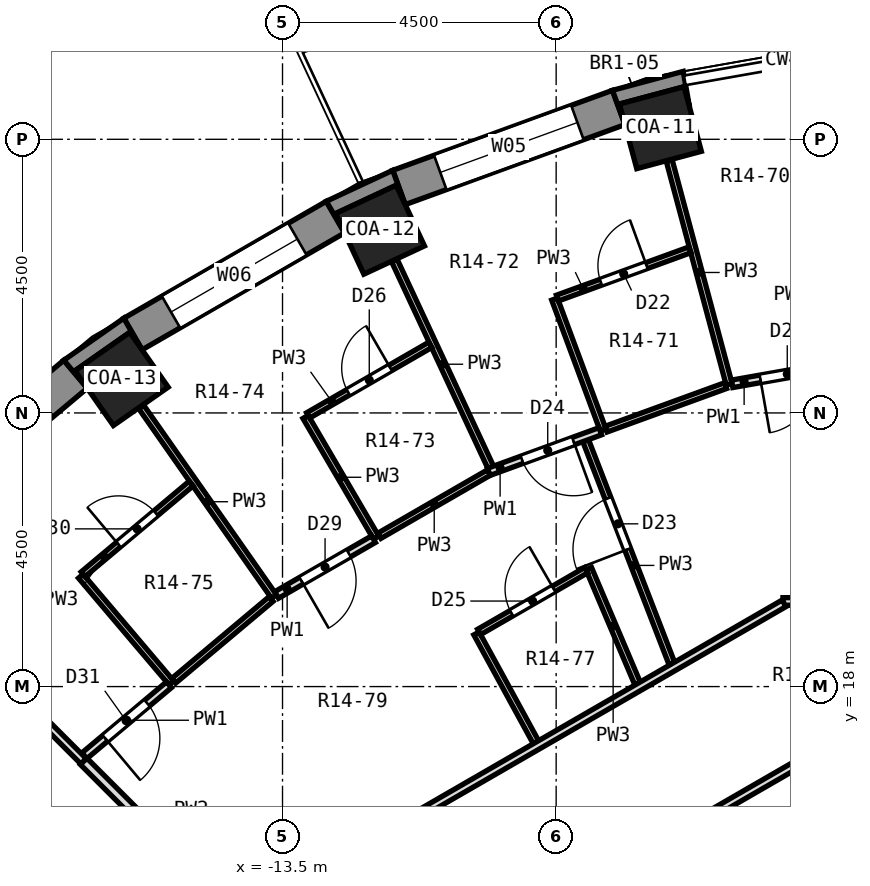
"""IFC4 building model, lengths in metres.
Left out: names, types, materials, properties, quantities, classifications, styles, units other than length and angle.
Written with IfcOpenShell. Run it as: python <this file> out.ifc"""

import sys

from ifc_helpers import new_model, si_unit, direction, frame, frame_2d, origin, origin_2d, place, context, subcontext, project, spatial, polyline, rectangle, outline, extrude, element, fill, save


model = new_model("IFC4")
c1 = context("Model", 3, precision=1e-05, world=origin(), true_north=direction((0.0, 1.0)))
c2 = subcontext(c1, "Body", "Model", "MODEL_VIEW")
j1 = project(units=[si_unit("LENGTHUNIT", "METRE"), si_unit("PLANEANGLEUNIT", "RADIAN")], contexts=[c1])
p1 = place(None, origin())
s1 = spatial("IfcSite", under=j1, at=p1, CompositionType="ELEMENT")
p2 = place(p1, origin())
s2 = spatial("IfcBuilding", under=s1, at=p2, CompositionType="ELEMENT")
p3 = place(p2, frame((0.0, 0.0, 75.8)))
s3 = spatial("IfcBuildingStorey", under=s2, at=p3, CompositionType="ELEMENT", Elevation=75.8)
for number, where, z_axis, x_axis in (
    (1, (-7.286, 27.191, 0.0), (0.0, 0.0, 1.0), (-0.259, 0.966, 0.0)),
    (2, (-11.897, 25.512, 0.0), (0.0, 0.0, 1.0), (-0.423, 0.906, 0.0)),
    (3, (-16.146, 23.059, 0.0), (0.0, 0.0, 1.0), (-0.574, 0.819, 0.0)),
):
    element("IfcColumn", number, at=place(p3, frame(where, z_axis=z_axis, x_axis=x_axis)), inside=s3, PredefinedType="COLUMN", context=c2, shape_type="SweptSolid", body=[
        extrude(rectangle(XDim=1.1, YDim=1.1, at=origin_2d()), origin(), (0.0, 0.0, 1.0), 3.3),
    ])
p4 = place(p3, frame((-7.971, 27.523, 0.0), z_axis=(0.0, 0.0, 1.0), x_axis=(-0.939689588564, -0.342028474173, 0.0)))
e4 = element("IfcWall", 4, at=p4, inside=s3, PredefinedType="SOLIDWALL", context=c2, shape_type="SweptSolid", body=[
    extrude(rectangle(XDim=3.846, YDim=0.6, at=frame_2d((1.923, 0.0))), origin(), (0.0, 0.0, 1.0), 2.75),
])
p5 = place(p4, frame((0.723, 0.0, 0.9)))
e5 = element("IfcOpeningElement", 5, at=p5, cuts=e4, PredefinedType="OPENING", context=c2, shape_type="SweptSolid", body=[
    extrude(rectangle(XDim=2.4, YDim=1.8, at=frame_2d((1.2, 0.9))), frame((0.0, 0.312, 0.0), z_axis=(0.0, -1.0, 0.0), x_axis=(1.0, 0.0, 0.0)), (0.0, 0.0, 1.0), 0.624),
])
p6 = place(p3, frame((-12.63, 25.721, 0.0), z_axis=(0.0, 0.0, 1.0), x_axis=(-0.86603124159, -0.499989888488, 0.0)))
e6 = element("IfcWall", 6, at=p6, inside=s3, PredefinedType="SOLIDWALL", context=c2, shape_type="SweptSolid", body=[
    extrude(rectangle(XDim=3.846, YDim=0.6, at=frame_2d((1.923, 0.0))), origin(), (0.0, 0.0, 1.0), 2.75),
])
p7 = place(p6, frame((0.723, 0.0, 0.9)))
e7 = element("IfcOpeningElement", 7, at=p7, cuts=e6, PredefinedType="OPENING", context=c2, shape_type="SweptSolid", body=[
    extrude(rectangle(XDim=2.4, YDim=1.8, at=frame_2d((1.2, 0.9))), frame((0.0, 0.312, 0.0), z_axis=(0.0, -1.0, 0.0), x_axis=(1.0, 0.0, 0.0)), (0.0, 0.0, 1.0), 0.624),
])
p8 = place(p3, frame((-16.904, 23.137, 0.0), z_axis=(0.0, 0.0, 1.0), x_axis=(-0.766026164483, -0.642809392687, 0.0)))
e8 = element("IfcWall", 8, at=p8, inside=s3, PredefinedType="SOLIDWALL", context=c2, shape_type="SweptSolid", body=[
    extrude(rectangle(XDim=3.846, YDim=0.6, at=frame_2d((1.923, 0.0))), origin(), (0.0, 0.0, 1.0), 2.75),
])
p9 = place(p8, frame((0.723, 0.0, 0.9)))
e9 = element("IfcOpeningElement", 9, at=p9, cuts=e8, PredefinedType="OPENING", context=c2, shape_type="SweptSolid", body=[
    extrude(rectangle(XDim=2.4, YDim=1.8, at=frame_2d((1.2, 0.9))), frame((0.0, 0.312, 0.0), z_axis=(0.0, -1.0, 0.0), x_axis=(1.0, 0.0, 0.0)), (0.0, 0.0, 1.0), 0.624),
])
p10 = place(p3, origin())
e10 = element("IfcWall", 10, at=p10, inside=s3, PredefinedType="SOLIDWALL", context=c2, shape_type="SweptSolid", body=[
    extrude(outline(polyline([(-6.91, 28.117), (-8.074, 27.805), (-7.869, 27.241), (-7.959, 27.58), (-6.897, 27.865), (-6.806, 27.526), (-6.91, 28.117)])), origin(), (0.0, 0.0, 1.0), 2.75),
])
p11 = place(p3, origin())
e11 = element("IfcWall", 11, at=p11, inside=s3, PredefinedType="SOLIDWALL", context=c2, shape_type="SweptSolid", body=[
    extrude(outline(polyline([(-12.78, 25.981), (-12.479, 25.461), (-12.628, 25.779), (-11.631, 26.243), (-11.483, 25.926), (-11.688, 26.49), (-12.78, 25.981)])), origin(), (0.0, 0.0, 1.0), 2.75),
])
p12 = place(p3, origin())
e12 = element("IfcWall", 12, at=p12, inside=s3, PredefinedType="SOLIDWALL", context=c2, shape_type="SweptSolid", body=[
    extrude(outline(polyline([(-16.11, 24.058), (-17.097, 23.367), (-16.711, 22.907), (-16.912, 23.194), (-16.011, 23.825), (-15.81, 23.538), (-16.11, 24.058)])), origin(), (0.0, 0.0, 1.0), 2.75),
])
p13 = place(p3, frame((-7.14, 26.65, 0.0), z_axis=(0.0, 0.0, 1.0), x_axis=(0.258575921205, -0.965990938349, 0.0)))
e13 = element("IfcWall", 13, at=p13, inside=s3, PredefinedType="PARTITIONING", context=c2, shape_type="SweptSolid", body=[
    extrude(rectangle(XDim=3.81, YDim=0.1, at=frame_2d((1.905, 0.0))), origin(), (0.0, 0.0, 1.0), 2.75),
])
p14 = place(p3, frame((-9.026, 24.372, 0.0), z_axis=(0.0, 0.0, 1.0), x_axis=(0.347431936108, -0.937705204087, 0.0)))
e14 = element("IfcWall", 14, at=p14, inside=s3, PredefinedType="PARTITIONING", context=c2, shape_type="SweptSolid", body=[
    extrude(rectangle(XDim=2.299, YDim=0.1, at=frame_2d((1.15, 0.0))), origin(), (0.0, 0.0, 1.0), 2.75),
])
p15 = place(p3, frame((-8.514, 22.045, 0.0), z_axis=(0.0, 0.0, 1.0), x_axis=(0.360450824224, -0.932778217647, 0.0)))
e15 = element("IfcWall", 15, at=p15, inside=s3, PredefinedType="PARTITIONING", context=c2, shape_type="SweptSolid", body=[
    extrude(rectangle(XDim=3.934, YDim=0.1, at=frame_2d((1.967, 0.0))), origin(), (0.0, 0.0, 1.0), 2.75),
])
p16 = place(p15, frame((1.017, 0.0, 0.0)))
e16 = element("IfcOpeningElement", 16, at=p16, cuts=e15, PredefinedType="OPENING", context=c2, shape_type="SweptSolid", body=[
    extrude(rectangle(XDim=0.9, YDim=2.1, at=frame_2d((0.45, 1.05))), frame((0.0, 0.062, 0.0), z_axis=(0.0, -1.0, 0.0), x_axis=(1.0, 0.0, 0.0)), (0.0, 0.0, 1.0), 0.124),
])
p17 = place(p3, frame((-8.464, 19.939, 0.0), z_axis=(0.0, 0.0, 1.0), x_axis=(0.391032350376, -0.920376934174, 0.0)))
e17 = element("IfcWall", 17, at=p17, inside=s3, PredefinedType="PARTITIONING", context=c2, shape_type="SweptSolid", body=[
    extrude(rectangle(XDim=2.053, YDim=0.1, at=frame_2d((1.026, 0.0))), origin(), (0.0, 0.0, 1.0), 2.75),
])
p18 = place(p3, frame((-11.66, 25.005, 0.0), z_axis=(0.0, 0.0, 1.0), x_axis=(0.422316636066, -0.906448376303, 0.0)))
e18 = element("IfcWall", 18, at=p18, inside=s3, PredefinedType="PARTITIONING", context=c2, shape_type="SweptSolid", body=[
    extrude(rectangle(XDim=3.76, YDim=0.1, at=frame_2d((1.88, 0.0))), origin(), (0.0, 0.0, 1.0), 2.75),
])
p19 = place(p3, frame((-10.31, 18.874, 0.0), z_axis=(0.0, 0.0, 1.0), x_axis=(0.479305195881, -0.877648294707, 0.0)))
e19 = element("IfcWall", 19, at=p19, inside=s3, PredefinedType="PARTITIONING", context=c2, shape_type="SweptSolid", body=[
    extrude(rectangle(XDim=2.039, YDim=0.1, at=frame_2d((1.019, 0.0))), origin(), (0.0, 0.0, 1.0), 2.75),
])
p20 = place(p3, frame((-13.121, 22.435, 0.0), z_axis=(0.0, 0.0, 1.0), x_axis=(0.504708754908, -0.863289680651, 0.0)))
e20 = element("IfcWall", 20, at=p20, inside=s3, PredefinedType="PARTITIONING", context=c2, shape_type="SweptSolid", body=[
    extrude(rectangle(XDim=2.301, YDim=0.1, at=frame_2d((1.15, 0.0))), origin(), (0.0, 0.0, 1.0), 2.75),
])
p21 = place(p3, frame((-15.825, 22.601, 0.0), z_axis=(0.0, 0.0, 1.0), x_axis=(0.573574167811, -0.819153632733, 0.0)))
e21 = element("IfcWall", 21, at=p21, inside=s3, PredefinedType="PARTITIONING", context=c2, shape_type="SweptSolid", body=[
    extrude(rectangle(XDim=3.81, YDim=0.1, at=frame_2d((1.905, 0.0))), origin(), (0.0, 0.0, 1.0), 2.75),
])
p22 = place(p3, frame((-16.817, 19.816, 0.0), z_axis=(0.0, 0.0, 1.0), x_axis=(0.646883930741, -0.762588473653, 0.0)))
e22 = element("IfcWall", 22, at=p22, inside=s3, PredefinedType="PARTITIONING", context=c2, shape_type="SweptSolid", body=[
    extrude(rectangle(XDim=2.3, YDim=0.1, at=frame_2d((1.15, 0.0))), origin(), (0.0, 0.0, 1.0), 2.75),
])
p23 = place(p3, frame((-19.509, 19.509, 0.0), z_axis=(0.0, 0.0, 1.0), x_axis=(0.707106781187, -0.707106781187, 0.0)))
e23 = element("IfcWall", 23, at=p23, inside=s3, PredefinedType="PARTITIONING", context=c2, shape_type="SweptSolid", body=[
    extrude(rectangle(XDim=3.873, YDim=0.125, at=frame_2d((1.936, 0.0))), origin(), (0.0, 0.0, 1.0), 2.75),
])
p24 = place(p3, frame((-16.771, 16.771, 0.0), z_axis=(0.0, 0.0, 1.0), x_axis=(0.707106781187, -0.707106781187, 0.0)))
e24 = element("IfcWall", 24, at=p24, inside=s3, PredefinedType="PARTITIONING", context=c2, shape_type="SweptSolid", body=[
    extrude(rectangle(XDim=3.633, YDim=0.15, at=frame_2d((1.816, 0.0))), origin(), (0.0, 0.0, 1.0), 2.75),
])
p25 = place(p3, frame((-5.27, 19.4, 0.0), z_axis=(0.0, 0.0, 1.0), x_axis=(1.0, 0.0, 0.0)))
e25 = element("IfcWall", 25, at=p25, inside=s3, PredefinedType="PARTITIONING", context=c2, shape_type="SweptSolid", body=[
    extrude(rectangle(XDim=10.406, YDim=0.125, at=frame_2d((5.203, 0.0))), origin(), (0.0, 0.0, 1.0), 2.75),
])
p26 = place(p25, frame((8.686, 0.0, 0.0)))
e26 = element("IfcOpeningElement", 26, at=p26, cuts=e25, PredefinedType="OPENING", context=c2, shape_type="SweptSolid", body=[
    extrude(rectangle(XDim=1.0, YDim=2.1, at=frame_2d((0.5, 1.05))), frame((0.0, 0.074, 0.0), z_axis=(0.0, -1.0, 0.0), x_axis=(1.0, 0.0, 0.0)), (0.0, 0.0, 1.0), 0.149),
])
p27 = place(p25, frame((5.288, 0.0, 0.0)))
e27 = element("IfcOpeningElement", 27, at=p27, cuts=e25, PredefinedType="OPENING", context=c2, shape_type="SweptSolid", body=[
    extrude(rectangle(XDim=0.9, YDim=2.1, at=frame_2d((0.45, 1.05))), frame((0.0, 0.074, 0.0), z_axis=(0.0, -1.0, 0.0), x_axis=(1.0, 0.0, 0.0)), (0.0, 0.0, 1.0), 0.149),
])
p28 = place(p25, frame((1.323, 0.0, 0.0)))
e28 = element("IfcOpeningElement", 28, at=p28, cuts=e25, PredefinedType="OPENING", context=c2, shape_type="SweptSolid", body=[
    extrude(rectangle(XDim=1.0, YDim=2.1, at=frame_2d((0.5, 1.05))), frame((0.0, 0.074, 0.0), z_axis=(0.0, -1.0, 0.0), x_axis=(1.0, 0.0, 0.0)), (0.0, 0.0, 1.0), 0.149),
])
p29 = place(p3, frame((-6.106, 22.979, 0.0), z_axis=(0.0, 0.0, 1.0), x_axis=(0.984808921368, 0.173641551464, 0.0)))
e29 = element("IfcWall", 29, at=p29, inside=s3, PredefinedType="PARTITIONING", context=c2, shape_type="SweptSolid", body=[
    extrude(rectangle(XDim=1.841, YDim=0.125, at=frame_2d((0.92, 0.0))), origin(), (0.0, 0.0, 1.0), 2.75),
])
p30 = place(p29, frame((0.47, 0.0, 0.0)))
e30 = element("IfcOpeningElement", 30, at=p30, cuts=e29, PredefinedType="OPENING", context=c2, shape_type="SweptSolid", body=[
    extrude(rectangle(XDim=0.9, YDim=2.1, at=frame_2d((0.45, 1.05))), frame((0.0, 0.074, 0.0), z_axis=(0.0, -1.0, 0.0), x_axis=(1.0, 0.0, 0.0)), (0.0, 0.0, 1.0), 0.149),
])
p31 = place(p3, frame((-8.18, 22.233, 0.0), z_axis=(0.0, 0.0, 1.0), x_axis=(0.939708229367, 0.341977256056, 0.0)))
e31 = element("IfcWall", 31, at=p31, inside=s3, PredefinedType="PARTITIONING", context=c2, shape_type="SweptSolid", body=[
    extrude(rectangle(XDim=2.093, YDim=0.1, at=frame_2d((1.046, 0.0))), origin(), (0.0, 0.0, 1.0), 2.75),
])
p32 = place(p3, frame((-10.11, 21.53, 0.0), z_axis=(0.0, 0.0, 1.0), x_axis=(0.939599898996, 0.342274786986, 0.0)))
e32 = element("IfcWall", 32, at=p32, inside=s3, PredefinedType="PARTITIONING", context=c2, shape_type="SweptSolid", body=[
    extrude(rectangle(XDim=1.954, YDim=0.125, at=frame_2d((0.977, 0.0))), origin(), (0.0, 0.0, 1.0), 2.75),
])
p33 = place(p32, frame((0.583, 0.0, 0.0)))
e33 = element("IfcOpeningElement", 33, at=p33, cuts=e32, PredefinedType="OPENING", context=c2, shape_type="SweptSolid", body=[
    extrude(rectangle(XDim=0.9, YDim=2.1, at=frame_2d((0.45, 1.05))), frame((0.0, 0.074, 0.0), z_axis=(0.0, -1.0, 0.0), x_axis=(1.0, 0.0, 0.0)), (0.0, 0.0, 1.0), 0.149),
])
p34 = place(p3, frame((-8.979, 24.389, 0.0), z_axis=(0.0, 0.0, 1.0), x_axis=(0.93967659433, 0.342064172443, 0.0)))
e34 = element("IfcWall", 34, at=p34, inside=s3, PredefinedType="PARTITIONING", context=c2, shape_type="SweptSolid", body=[
    extrude(rectangle(XDim=2.32, YDim=0.1, at=frame_2d((1.16, 0.0))), origin(), (0.0, 0.0, 1.0), 2.75),
])
p35 = place(p34, frame((0.76, 0.0, 0.0)))
e35 = element("IfcOpeningElement", 35, at=p35, cuts=e34, PredefinedType="OPENING", context=c2, shape_type="SweptSolid", body=[
    extrude(rectangle(XDim=0.8, YDim=2.1, at=frame_2d((0.4, 1.05))), frame((0.0, 0.062, 0.0), z_axis=(0.0, -1.0, 0.0), x_axis=(1.0, 0.0, 0.0)), (0.0, 0.0, 1.0), 0.124),
])
p36 = place(p3, frame((-13.597, 19.506, 0.0), z_axis=(0.0, 0.0, 1.0), x_axis=(0.866538954681, 0.499109446936, 0.0)))
e36 = element("IfcWall", 36, at=p36, inside=s3, PredefinedType="PARTITIONING", context=c2, shape_type="SweptSolid", body=[
    extrude(rectangle(XDim=1.839, YDim=0.125, at=frame_2d((0.919, 0.0))), origin(), (0.0, 0.0, 1.0), 2.75),
])
p37 = place(p36, frame((0.47, 0.0, 0.0)))
e37 = element("IfcOpeningElement", 37, at=p37, cuts=e36, PredefinedType="OPENING", context=c2, shape_type="SweptSolid", body=[
    extrude(rectangle(XDim=0.9, YDim=2.1, at=frame_2d((0.45, 1.05))), frame((0.0, 0.074, 0.0), z_axis=(0.0, -1.0, 0.0), x_axis=(1.0, 0.0, 0.0)), (0.0, 0.0, 1.0), 0.149),
])
p38 = place(p3, frame((-12.391, 12.476, 0.0), z_axis=(0.0, 0.0, 1.0), x_axis=(0.866042609802, 0.499970197119, 0.0)))
e38 = element("IfcWall", 38, at=p38, inside=s3, PredefinedType="PARTITIONING", context=c2, shape_type="SweptSolid", body=[
    extrude(rectangle(XDim=8.985, YDim=0.125, at=frame_2d((4.493, 0.0))), origin(), (0.0, 0.0, 1.0), 2.75),
])
p39 = place(p38, frame((4.043, 0.0, 0.0)))
e39 = element("IfcOpeningElement", 39, at=p39, cuts=e38, PredefinedType="OPENING", context=c2, shape_type="SweptSolid", body=[
    extrude(rectangle(XDim=0.9, YDim=2.1, at=frame_2d((0.45, 1.05))), frame((0.0, 0.074, 0.0), z_axis=(0.0, -1.0, 0.0), x_axis=(1.0, 0.0, 0.0)), (0.0, 0.0, 1.0), 0.149),
])
p40 = place(p3, frame((-14.137, 14.24, 0.0), z_axis=(0.0, 0.0, 1.0), x_axis=(0.866045301435, 0.499965534674, 0.0)))
e40 = element("IfcWall", 40, at=p40, inside=s3, PredefinedType="PARTITIONING", context=c2, shape_type="SweptSolid", body=[
    extrude(rectangle(XDim=10.259, YDim=0.125, at=frame_2d((5.129, 0.0))), origin(), (0.0, 0.0, 1.0), 2.75),
])
p41 = place(p3, frame((-10.267, 18.899, 0.0), z_axis=(0.0, 0.0, 1.0), x_axis=(0.866149564305, 0.499784885981, 0.0)))
e41 = element("IfcWall", 41, at=p41, inside=s3, PredefinedType="PARTITIONING", context=c2, shape_type="SweptSolid", body=[
    extrude(rectangle(XDim=2.031, YDim=0.1, at=frame_2d((1.016, 0.0))), origin(), (0.0, 0.0, 1.0), 2.75),
])
p42 = place(p41, frame((0.615, 0.0, 0.0)))
e42 = element("IfcOpeningElement", 42, at=p42, cuts=e41, PredefinedType="OPENING", context=c2, shape_type="SweptSolid", body=[
    extrude(rectangle(XDim=0.8, YDim=2.1, at=frame_2d((0.4, 1.05))), frame((0.0, 0.062, 0.0), z_axis=(0.0, -1.0, 0.0), x_axis=(1.0, 0.0, 0.0)), (0.0, 0.0, 1.0), 0.124),
])
p43 = place(p3, frame((-11.906, 20.48, 0.0), z_axis=(0.0, 0.0, 1.0), x_axis=(0.865966712092, 0.500101643217, 0.0)))
e43 = element("IfcWall", 43, at=p43, inside=s3, PredefinedType="PARTITIONING", context=c2, shape_type="SweptSolid", body=[
    extrude(rectangle(XDim=2.081, YDim=0.1, at=frame_2d((1.04, 0.0))), origin(), (0.0, 0.0, 1.0), 2.75),
])
p44 = place(p3, frame((-13.078, 22.46, 0.0), z_axis=(0.0, 0.0, 1.0), x_axis=(0.865947141423, 0.500135529893, 0.0)))
e44 = element("IfcWall", 44, at=p44, inside=s3, PredefinedType="PARTITIONING", context=c2, shape_type="SweptSolid", body=[
    extrude(rectangle(XDim=2.319, YDim=0.1, at=frame_2d((1.16, 0.0))), origin(), (0.0, 0.0, 1.0), 2.75),
])
p45 = place(p44, frame((0.76, 0.0, 0.0)))
e45 = element("IfcOpeningElement", 45, at=p45, cuts=e44, PredefinedType="OPENING", context=c2, shape_type="SweptSolid", body=[
    extrude(rectangle(XDim=0.8, YDim=2.1, at=frame_2d((0.4, 1.05))), frame((0.0, 0.062, 0.0), z_axis=(0.0, -1.0, 0.0), x_axis=(1.0, 0.0, 0.0)), (0.0, 0.0, 1.0), 0.124),
])
p46 = place(p3, frame((-15.291, 18.094, 0.0), z_axis=(0.0, 0.0, 1.0), x_axis=(0.765911671875, 0.642945807114, 0.0)))
e46 = element("IfcWall", 46, at=p46, inside=s3, PredefinedType="PARTITIONING", context=c2, shape_type="SweptSolid", body=[
    extrude(rectangle(XDim=2.093, YDim=0.1, at=frame_2d((1.046, 0.0))), origin(), (0.0, 0.0, 1.0), 2.75),
])
p47 = place(p3, frame((-16.758, 16.863, 0.0), z_axis=(0.0, 0.0, 1.0), x_axis=(0.766088979655, 0.642734529375, 0.0)))
e47 = element("IfcWall", 47, at=p47, inside=s3, PredefinedType="PARTITIONING", context=c2, shape_type="SweptSolid", body=[
    extrude(rectangle(XDim=1.815, YDim=0.125, at=frame_2d((0.907, 0.0))), origin(), (0.0, 0.0, 1.0), 2.75),
])
p48 = place(p47, frame((0.445, 0.0, 0.0)))
e48 = element("IfcOpeningElement", 48, at=p48, cuts=e47, PredefinedType="OPENING", context=c2, shape_type="SweptSolid", body=[
    extrude(rectangle(XDim=0.9, YDim=2.1, at=frame_2d((0.45, 1.05))), frame((0.0, 0.074, 0.0), z_axis=(0.0, -1.0, 0.0), x_axis=(1.0, 0.0, 0.0)), (0.0, 0.0, 1.0), 0.149),
])
p49 = place(p3, frame((-16.779, 19.848, 0.0), z_axis=(0.0, 0.0, 1.0), x_axis=(0.766051078848, 0.642779701449, 0.0)))
e49 = element("IfcWall", 49, at=p49, inside=s3, PredefinedType="PARTITIONING", context=c2, shape_type="SweptSolid", body=[
    extrude(rectangle(XDim=2.319, YDim=0.1, at=frame_2d((1.16, 0.0))), origin(), (0.0, 0.0, 1.0), 2.75),
])
p50 = place(p49, frame((0.76, 0.0, 0.0)))
e50 = element("IfcOpeningElement", 50, at=p50, cuts=e49, PredefinedType="OPENING", context=c2, shape_type="SweptSolid", body=[
    extrude(rectangle(XDim=0.8, YDim=2.1, at=frame_2d((0.4, 1.05))), frame((0.0, 0.062, 0.0), z_axis=(0.0, -1.0, 0.0), x_axis=(1.0, 0.0, 0.0)), (0.0, 0.0, 1.0), 0.124),
])
p51 = place(p5, origin())
e51 = element("IfcWindow", 51, at=p51, inside=s3, PartitioningType="SINGLE_PANEL", PredefinedType="WINDOW", context=c2, shape_type="SweptSolid", body=[
    extrude(rectangle(XDim=2.4, YDim=1.8, at=frame_2d((1.2, 0.9))), frame((0.0, 0.18, 0.0), z_axis=(0.0, -1.0, 0.0), x_axis=(1.0, 0.0, 0.0)), (0.0, 0.0, 1.0), 0.06),
])
fill(e5, e51)
p52 = place(p7, origin())
e52 = element("IfcWindow", 52, at=p52, inside=s3, PartitioningType="SINGLE_PANEL", PredefinedType="WINDOW", context=c2, shape_type="SweptSolid", body=[
    extrude(rectangle(XDim=2.4, YDim=1.8, at=frame_2d((1.2, 0.9))), frame((0.0, 0.18, 0.0), z_axis=(0.0, -1.0, 0.0), x_axis=(1.0, 0.0, 0.0)), (0.0, 0.0, 1.0), 0.06),
])
fill(e7, e52)
p53 = place(p30, frame((0.9, 0.0, 0.0), z_axis=(0.0, 0.0, 1.0), x_axis=(-1.0, 0.0, 0.0)))
e53 = element("IfcDoor", 53, at=p53, inside=s3, OperationType="SINGLE_SWING_RIGHT", PredefinedType="DOOR", context=c2, shape_type="SweptSolid", body=[
    extrude(rectangle(XDim=0.9, YDim=2.1, at=frame_2d((0.45, 1.05))), frame((0.0, 0.025, 0.0), z_axis=(0.0, -1.0, 0.0), x_axis=(1.0, 0.0, 0.0)), (0.0, 0.0, 1.0), 0.05),
])
fill(e30, e53)
p54 = place(p35, origin())
e54 = element("IfcDoor", 54, at=p54, inside=s3, OperationType="SINGLE_SWING_RIGHT", PredefinedType="DOOR", context=c2, shape_type="SweptSolid", body=[
    extrude(rectangle(XDim=0.8, YDim=2.1, at=frame_2d((0.4, 1.05))), frame((0.0, 0.025, 0.0), z_axis=(0.0, -1.0, 0.0), x_axis=(1.0, 0.0, 0.0)), (0.0, 0.0, 1.0), 0.05),
])
fill(e35, e54)
p55 = place(p16, frame((0.9, 0.0, 0.0), z_axis=(0.0, 0.0, 1.0), x_axis=(-1.0, 0.0, 0.0)))
e55 = element("IfcDoor", 55, at=p55, inside=s3, OperationType="SINGLE_SWING_LEFT", PredefinedType="DOOR", context=c2, shape_type="SweptSolid", body=[
    extrude(rectangle(XDim=0.9, YDim=2.1, at=frame_2d((0.45, 1.05))), frame((0.0, 0.025, 0.0), z_axis=(0.0, -1.0, 0.0), x_axis=(1.0, 0.0, 0.0)), (0.0, 0.0, 1.0), 0.05),
])
fill(e16, e55)
p56 = place(p33, frame((0.9, 0.0, 0.0), z_axis=(0.0, 0.0, 1.0), x_axis=(-1.0, 0.0, 0.0)))
e56 = element("IfcDoor", 56, at=p56, inside=s3, OperationType="SINGLE_SWING_LEFT", PredefinedType="DOOR", context=c2, shape_type="SweptSolid", body=[
    extrude(rectangle(XDim=0.9, YDim=2.1, at=frame_2d((0.45, 1.05))), frame((0.0, 0.025, 0.0), z_axis=(0.0, -1.0, 0.0), x_axis=(1.0, 0.0, 0.0)), (0.0, 0.0, 1.0), 0.05),
])
fill(e33, e56)
p57 = place(p42, origin())
e57 = element("IfcDoor", 57, at=p57, inside=s3, OperationType="SINGLE_SWING_RIGHT", PredefinedType="DOOR", context=c2, shape_type="SweptSolid", body=[
    extrude(rectangle(XDim=0.8, YDim=2.1, at=frame_2d((0.4, 1.05))), frame((0.0, 0.025, 0.0), z_axis=(0.0, -1.0, 0.0), x_axis=(1.0, 0.0, 0.0)), (0.0, 0.0, 1.0), 0.05),
])
fill(e42, e57)
p58 = place(p45, origin())
e58 = element("IfcDoor", 58, at=p58, inside=s3, OperationType="SINGLE_SWING_RIGHT", PredefinedType="DOOR", context=c2, shape_type="SweptSolid", body=[
    extrude(rectangle(XDim=0.8, YDim=2.1, at=frame_2d((0.4, 1.05))), frame((0.0, 0.025, 0.0), z_axis=(0.0, -1.0, 0.0), x_axis=(1.0, 0.0, 0.0)), (0.0, 0.0, 1.0), 0.05),
])
fill(e45, e58)
p59 = place(p37, frame((0.9, 0.0, 0.0), z_axis=(0.0, 0.0, 1.0), x_axis=(-1.0, 0.0, 0.0)))
e59 = element("IfcDoor", 59, at=p59, inside=s3, OperationType="SINGLE_SWING_RIGHT", PredefinedType="DOOR", context=c2, shape_type="SweptSolid", body=[
    extrude(rectangle(XDim=0.9, YDim=2.1, at=frame_2d((0.45, 1.05))), frame((0.0, 0.025, 0.0), z_axis=(0.0, -1.0, 0.0), x_axis=(1.0, 0.0, 0.0)), (0.0, 0.0, 1.0), 0.05),
])
fill(e37, e59)
p60 = place(p50, origin())
e60 = element("IfcDoor", 60, at=p60, inside=s3, OperationType="SINGLE_SWING_LEFT", PredefinedType="DOOR", context=c2, shape_type="SweptSolid", body=[
    extrude(rectangle(XDim=0.8, YDim=2.1, at=frame_2d((0.4, 1.05))), frame((0.0, 0.025, 0.0), z_axis=(0.0, -1.0, 0.0), x_axis=(1.0, 0.0, 0.0)), (0.0, 0.0, 1.0), 0.05),
])
fill(e50, e60)
p61 = place(p48, frame((0.9, 0.0, 0.0), z_axis=(0.0, 0.0, 1.0), x_axis=(-1.0, 0.0, 0.0)))
e61 = element("IfcDoor", 61, at=p61, inside=s3, OperationType="SINGLE_SWING_RIGHT", PredefinedType="DOOR", context=c2, shape_type="SweptSolid", body=[
    extrude(rectangle(XDim=0.9, YDim=2.1, at=frame_2d((0.45, 1.05))), frame((0.0, 0.025, 0.0), z_axis=(0.0, -1.0, 0.0), x_axis=(1.0, 0.0, 0.0)), (0.0, 0.0, 1.0), 0.05),
])
fill(e48, e61)
save(model, sys.argv[1])
